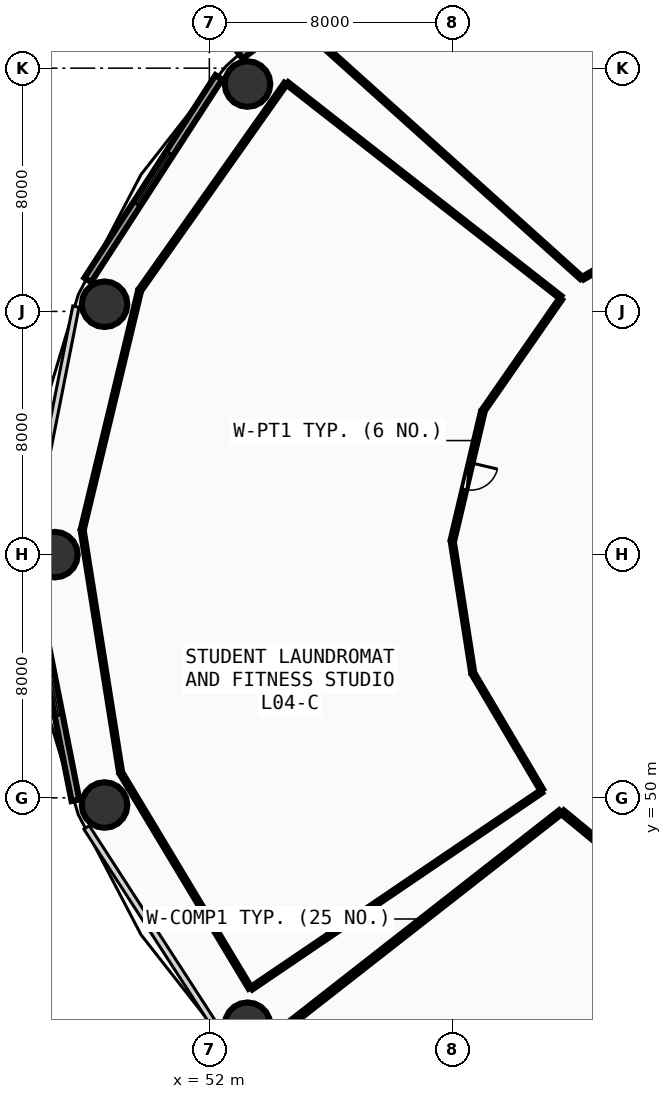
"""IFC4 building model, lengths in metres.
Left out: names, types, materials, properties, quantities, classifications, styles, units other than length and angle.
Written with IfcOpenShell. Run it as: python <this file> out.ifc"""

import sys

from ifc_helpers import new_model, si_unit, direction, frame, frame_2d, origin, origin_2d, place, context, subcontext, project, spatial, rectangle, circle, extrude, element, fill, save


model = new_model("IFC4")
c1 = context("Model", 3, precision=1e-05, world=origin(), true_north=direction((0.0, 1.0)))
c2 = subcontext(c1, "Body", "Model", "MODEL_VIEW")
j1 = project(units=[si_unit("LENGTHUNIT", "METRE"), si_unit("PLANEANGLEUNIT", "RADIAN")], contexts=[c1])
p1 = place(None, origin())
s1 = spatial("IfcSite", under=j1, at=p1, CompositionType="ELEMENT")
p2 = place(p1, origin())
s2 = spatial("IfcBuilding", under=s1, at=p2, CompositionType="ELEMENT")
p3 = place(p2, frame((0.0, 0.0, 18.0)))
s3 = spatial("IfcBuildingStorey", under=s2, at=p3, CompositionType="ELEMENT", Elevation=18.0)
for number, where, z_axis, x_axis in (
    (1, (53.256, 73.478, 0.0), (0.0, 0.0, 1.0), (1.0, 0.0, 0.0)),
    (2, (48.553, 66.236, 0.0), (0.0, 0.0, 1.0), (1.0, 0.0, 0.0)),
    (3, (46.92, 58.0, 0.0), (0.0, 0.0, 1.0), (1.0, 0.0, 0.0)),
    (4, (48.553, 49.764, 0.0), (0.0, 0.0, 1.0), (1.0, 0.0, 0.0)),
    (5, (53.256, 42.522, 0.0), (0.0, 0.0, 1.0), (1.0, 0.0, 0.0)),
):
    element("IfcColumn", number, at=place(p3, frame(where, z_axis=z_axis, x_axis=x_axis)), inside=s3, PredefinedType="COLUMN", context=c2, shape_type="SweptSolid", body=[
        extrude(circle(Radius=0.75, at=origin_2d()), origin(), (0.0, 0.0, 1.0), 4.5),
    ])
p4 = place(p3, frame((59.651, 79.389, 0.0), z_axis=(0.0, 0.0, 1.0), x_axis=(-0.80030733173, -0.599590005569, 0.0)))
e6 = element("IfcWall", 6, at=p4, inside=s3, PredefinedType="SOLIDWALL", context=c2, shape_type="SweptSolid", body=[
    extrude(rectangle(XDim=8.291, YDim=0.26, at=frame_2d((4.145, 0.0))), origin(), (0.0, 0.0, 1.0), 4.225),
])
p5 = place(p4, frame((3.145, 0.0, 0.85)))
e7 = element("IfcOpeningElement", 7, at=p5, cuts=e6, PredefinedType="OPENING", context=c2, shape_type="SweptSolid", body=[
    extrude(rectangle(XDim=2.0, YDim=1.75, at=frame_2d((1.0, 0.875))), frame((0.0, 0.14, 0.0), z_axis=(0.0, -1.0, 0.0), x_axis=(1.0, 0.0, 0.0)), (0.0, 0.0, 1.0), 0.28),
])
p6 = place(p3, frame((52.311, 73.698, 0.0), z_axis=(0.0, 0.0, 1.0), x_axis=(-0.543005114258, -0.839729388488, 0.0)))
e8 = element("IfcWall", 8, at=p6, inside=s3, PredefinedType="SOLIDWALL", context=c2, shape_type="SweptSolid", body=[
    extrude(rectangle(XDim=7.938, YDim=0.26, at=frame_2d((3.969, 0.0))), origin(), (0.0, 0.0, 1.0), 4.225),
])
p7 = place(p6, frame((2.969, 0.0, 0.85)))
e9 = element("IfcOpeningElement", 9, at=p7, cuts=e8, PredefinedType="OPENING", context=c2, shape_type="SweptSolid", body=[
    extrude(rectangle(XDim=2.0, YDim=1.75, at=frame_2d((1.0, 0.875))), frame((0.0, 0.14, 0.0), z_axis=(0.0, -1.0, 0.0), x_axis=(1.0, 0.0, 0.0)), (0.0, 0.0, 1.0), 0.28),
])
p8 = place(p3, frame((46.104, 57.477, 0.0), z_axis=(0.0, 0.0, 1.0), x_axis=(0.193726159581, -0.98105564322, 0.0)))
e10 = element("IfcWall", 10, at=p8, inside=s3, PredefinedType="SOLIDWALL", context=c2, shape_type="SweptSolid", body=[
    extrude(rectangle(XDim=7.703, YDim=0.26, at=frame_2d((3.851, 0.0))), origin(), (0.0, 0.0, 1.0), 4.225),
])
p9 = place(p8, frame((2.851, 0.0, 0.85)))
e11 = element("IfcOpeningElement", 11, at=p9, cuts=e10, PredefinedType="OPENING", context=c2, shape_type="SweptSolid", body=[
    extrude(rectangle(XDim=2.0, YDim=1.75, at=frame_2d((1.0, 0.875))), frame((0.0, 0.14, 0.0), z_axis=(0.0, -1.0, 0.0), x_axis=(1.0, 0.0, 0.0)), (0.0, 0.0, 1.0), 0.28),
])
p10 = place(p3, frame((60.987, 62.67, 0.0), z_axis=(0.0, 0.0, 1.0), x_axis=(-0.229728237891, -0.973254815922, 0.0)))
e12 = element("IfcWall", 12, at=p10, inside=s3, PredefinedType="PARTITIONING", context=c2, shape_type="SweptSolid", body=[
    extrude(rectangle(XDim=4.286, YDim=0.12, at=frame_2d((2.143, 0.0))), origin(), (0.0, 0.0, 1.0), 4.23),
])
p11 = place(p10, frame((1.693, 0.0, 0.0)))
e13 = element("IfcOpeningElement", 13, at=p11, cuts=e12, PredefinedType="OPENING", context=c2, shape_type="SweptSolid", body=[
    extrude(rectangle(XDim=0.9, YDim=2.08, at=frame_2d((0.45, 1.04))), frame((0.0, 0.07, 0.0), z_axis=(0.0, -1.0, 0.0), x_axis=(1.0, 0.0, 0.0)), (0.0, 0.0, 1.0), 0.14),
])
p12 = place(p3, frame((68.713, 69.681, 0.0), z_axis=(0.0, 0.0, 1.0), x_axis=(-0.863300951282, -0.504689476327, 0.0)))
e14 = element("IfcWall", 14, at=p12, inside=s3, PredefinedType="PARTITIONING", context=c2, shape_type="SweptSolid", body=[
    extrude(rectangle(XDim=5.117, YDim=0.1, at=frame_2d((2.559, 0.0))), origin(), (0.0, 0.0, 1.0), 3.625),
])
p13 = place(p3, frame((64.231, 67.105, 0.0), z_axis=(0.0, 0.0, 1.0), x_axis=(-0.743473519906, 0.668765373803, 0.0)))
e15 = element("IfcWall", 15, at=p13, inside=s3, PredefinedType="PARTITIONING", context=c2, shape_type="SweptSolid", body=[
    extrude(rectangle(XDim=11.301, YDim=0.1, at=frame_2d((5.65, 0.0))), origin(), (0.0, 0.0, 1.0), 3.925),
])
p14 = place(p3, frame((63.558, 66.411, 0.0), z_axis=(0.0, 0.0, 1.0), x_axis=(-0.570335061888, -0.821412148182, 0.0)))
e16 = element("IfcWall", 16, at=p14, inside=s3, PredefinedType="PARTITIONING", context=c2, shape_type="SweptSolid", body=[
    extrude(rectangle(XDim=4.444, YDim=0.1, at=frame_2d((2.222, 0.0))), origin(), (0.0, 0.0, 1.0), 3.625),
])
p15 = place(p3, frame((59.995, 58.4, 0.0), z_axis=(0.0, 0.0, 1.0), x_axis=(0.15415409869, -0.988046817644, 0.0)))
e17 = element("IfcWall", 17, at=p15, inside=s3, PredefinedType="PARTITIONING", context=c2, shape_type="SweptSolid", body=[
    extrude(rectangle(XDim=4.312, YDim=0.1, at=frame_2d((2.156, 0.0))), origin(), (0.0, 0.0, 1.0), 3.625),
])
p16 = place(p3, frame((60.686, 54.066, 0.0), z_axis=(0.0, 0.0, 1.0), x_axis=(0.508587711925, -0.861010185351, 0.0)))
e18 = element("IfcWall", 18, at=p16, inside=s3, PredefinedType="PARTITIONING", context=c2, shape_type="SweptSolid", body=[
    extrude(rectangle(XDim=4.415, YDim=0.1, at=frame_2d((2.208, 0.0))), origin(), (0.0, 0.0, 1.0), 3.625),
])
p17 = place(p3, frame((62.919, 50.208, 0.0), z_axis=(0.0, 0.0, 1.0), x_axis=(-0.827473664196, -0.561504528086, 0.0)))
e19 = element("IfcWall", 19, at=p17, inside=s3, PredefinedType="PARTITIONING", context=c2, shape_type="SweptSolid", body=[
    extrude(rectangle(XDim=11.519, YDim=0.1, at=frame_2d((5.76, 0.0))), origin(), (0.0, 0.0, 1.0), 3.925),
])
p18 = place(p3, frame((53.333, 43.751, 0.0), z_axis=(0.0, 0.0, 1.0), x_axis=(-0.514827739773, 0.857293647684, 0.0)))
e20 = element("IfcWall", 20, at=p18, inside=s3, PredefinedType="PARTITIONING", context=c2, shape_type="SweptSolid", body=[
    extrude(rectangle(XDim=8.218, YDim=0.1, at=frame_2d((4.109, 0.0))), origin(), (0.0, 0.0, 1.0), 3.625),
])
p19 = place(p3, frame((49.076, 50.871, 0.0), z_axis=(0.0, 0.0, 1.0), x_axis=(-0.156702328253, 0.987645877995, 0.0)))
e21 = element("IfcWall", 21, at=p19, inside=s3, PredefinedType="PARTITIONING", context=c2, shape_type="SweptSolid", body=[
    extrude(rectangle(XDim=7.999, YDim=0.1, at=frame_2d((4.0, 0.0))), origin(), (0.0, 0.0, 1.0), 3.625),
])
p20 = place(p3, frame((47.825, 58.849, 0.0), z_axis=(0.0, 0.0, 1.0), x_axis=(0.233462700325, 0.972365758116, 0.0)))
e22 = element("IfcWall", 22, at=p20, inside=s3, PredefinedType="PARTITIONING", context=c2, shape_type="SweptSolid", body=[
    extrude(rectangle(XDim=8.025, YDim=0.1, at=frame_2d((4.012, 0.0))), origin(), (0.0, 0.0, 1.0), 3.625),
])
p21 = place(p3, frame((49.731, 66.724, 0.0), z_axis=(0.0, 0.0, 1.0), x_axis=(0.576563997372, 0.817051991573, 0.0)))
e23 = element("IfcWall", 23, at=p21, inside=s3, PredefinedType="PARTITIONING", context=c2, shape_type="SweptSolid", body=[
    extrude(rectangle(XDim=8.283, YDim=0.1, at=frame_2d((4.142, 0.0))), origin(), (0.0, 0.0, 1.0), 3.625),
])
p22 = place(p3, frame((54.562, 73.5, 0.0), z_axis=(0.0, 0.0, 1.0), x_axis=(0.787637262368, -0.616139223657, 0.0)))
e24 = element("IfcWall", 24, at=p22, inside=s3, PredefinedType="PARTITIONING", context=c2, shape_type="SweptSolid", body=[
    extrude(rectangle(XDim=11.411, YDim=0.1, at=frame_2d((5.706, 0.0))), origin(), (0.0, 0.0, 1.0), 3.625),
])
p23 = place(p3, frame((63.612, 49.531, 0.0), z_axis=(0.0, 0.0, 1.0), x_axis=(0.771403369324, -0.636346479361, 0.0)))
e25 = element("IfcWall", 25, at=p23, inside=s3, PredefinedType="PARTITIONING", context=c2, shape_type="SweptSolid", body=[
    extrude(rectangle(XDim=2.489, YDim=0.15, at=frame_2d((1.245, 0.0))), origin(), (0.0, 0.0, 1.0), 3.625),
])
p24 = place(p3, frame((54.562, 42.5, 0.0), z_axis=(0.0, 0.0, 1.0), x_axis=(0.787637262368, 0.616139223657, 0.0)))
e26 = element("IfcWall", 26, at=p24, inside=s3, PredefinedType="PARTITIONING", context=c2, shape_type="SweptSolid", body=[
    extrude(rectangle(XDim=11.411, YDim=0.15, at=frame_2d((5.706, 0.0))), origin(), (0.0, 0.0, 1.0), 3.625),
])
p25 = place(p7, origin())
e27 = element("IfcWindow", 27, at=p25, inside=s3, PartitioningType="SINGLE_PANEL", PredefinedType="WINDOW", context=c2, shape_type="SweptSolid", body=[
    extrude(rectangle(XDim=2.0, YDim=1.75, at=frame_2d((1.0, 0.875))), frame((0.0, 0.03, 0.0), z_axis=(0.0, -1.0, 0.0), x_axis=(1.0, 0.0, 0.0)), (0.0, 0.0, 1.0), 0.06),
])
fill(e9, e27)
p26 = place(p9, origin())
e28 = element("IfcWindow", 28, at=p26, inside=s3, PartitioningType="SINGLE_PANEL", PredefinedType="WINDOW", context=c2, shape_type="SweptSolid", body=[
    extrude(rectangle(XDim=2.0, YDim=1.75, at=frame_2d((1.0, 0.875))), frame((0.0, 0.03, 0.0), z_axis=(0.0, -1.0, 0.0), x_axis=(1.0, 0.0, 0.0)), (0.0, 0.0, 1.0), 0.06),
])
fill(e11, e28)
p27 = place(p11, origin())
e29 = element("IfcDoor", 29, at=p27, inside=s3, OperationType="SINGLE_SWING_LEFT", PredefinedType="DOOR", context=c2, shape_type="SweptSolid", body=[
    extrude(rectangle(XDim=0.9, YDim=2.08, at=frame_2d((0.45, 1.04))), frame((0.0, 0.025, 0.0), z_axis=(0.0, -1.0, 0.0), x_axis=(1.0, 0.0, 0.0)), (0.0, 0.0, 1.0), 0.05),
])
fill(e13, e29)
save(model, sys.argv[1])
